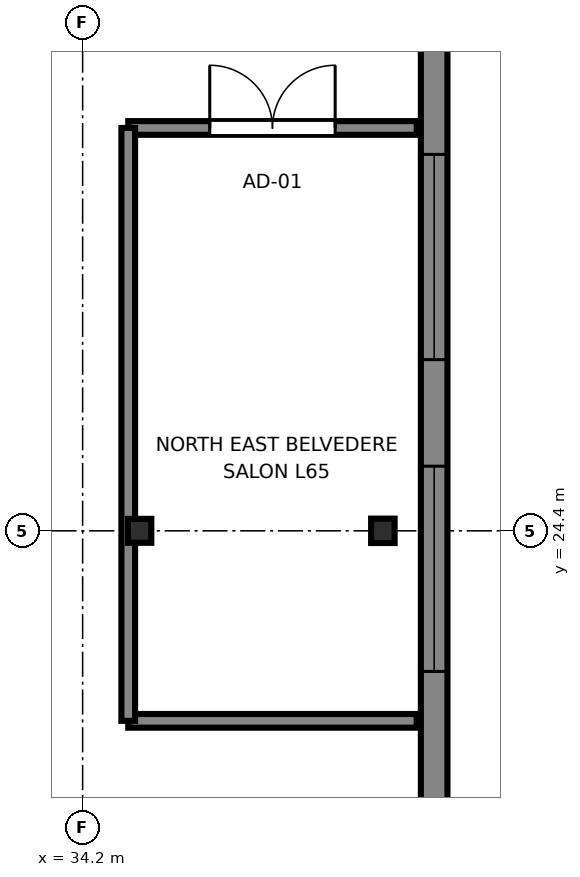
"""IFC4 building model, lengths in metres.
Left out: names, types, materials, properties, quantities, classifications, styles, units other than length and angle.
Written with IfcOpenShell. Run it as: python <this file> out.ifc"""

import sys

from ifc_helpers import new_model, si_unit, direction, frame, frame_2d, origin, origin_2d, place, context, subcontext, project, spatial, rectangle, i_section, extrude, source, transform, mapped, element, fill, save


model = new_model("IFC4")
c1 = context("Model", 3, precision=1e-05, world=origin(), true_north=direction((0.0, 1.0)))
c2 = subcontext(c1, "Body", "Model", "MODEL_VIEW")
j1 = project(units=[si_unit("LENGTHUNIT", "METRE"), si_unit("PLANEANGLEUNIT", "RADIAN")], contexts=[c1])
p1 = place(None, origin())
s1 = spatial("IfcSite", under=j1, at=p1, CompositionType="ELEMENT")
p2 = place(p1, origin())
s2 = spatial("IfcBuilding", under=s1, at=p2, CompositionType="ELEMENT")
p3 = place(p2, frame((0.0, 0.0, 245.2)))
s3 = spatial("IfcBuildingStorey", under=s2, at=p3, CompositionType="ELEMENT", Elevation=245.2)
m1 = source(origin(), c2, "Body", "SweptSolid", [
    extrude(i_section(OverallWidth=0.307, OverallDepth=0.315, WebThickness=0.012, FlangeThickness=0.019, FilletRadius=0.017, at=origin_2d()), origin(), (0.0, 0.0, 1.0), 3.55),
])
p4 = place(p3, frame((34.95, 24.4, 0.0), z_axis=(0.0, 0.0, 1.0), x_axis=(1.0, 0.0, 0.0)))
e1 = element("IfcColumn", 1, at=p4, inside=s3, PredefinedType="COLUMN", context=c2, shape_type="MappedRepresentation", body=[
    mapped(m1, transform((0.0, 0.0, 0.0), x_axis=(1.0, 0.0, 0.0), y_axis=(0.0, 1.0, 0.0), z_axis=(0.0, 0.0, 1.0), scale=1.0)),
])
m2 = source(origin(), c2, "Body", "SweptSolid", [
    extrude(i_section(OverallWidth=0.309, OverallDepth=0.321, WebThickness=0.014, FlangeThickness=0.022, FilletRadius=0.017, at=origin_2d()), origin(), (0.0, 0.0, 1.0), 3.55),
])
p5 = place(p3, frame((38.15, 24.4, 0.0), z_axis=(0.0, 0.0, 1.0), x_axis=(1.0, 0.0, 0.0)))
e2 = element("IfcColumn", 2, at=p5, inside=s3, PredefinedType="COLUMN", context=c2, shape_type="MappedRepresentation", body=[
    mapped(m2, transform((0.0, 0.0, 0.0), x_axis=(1.0, 0.0, 0.0), y_axis=(0.0, 1.0, 0.0), z_axis=(0.0, 0.0, 1.0), scale=1.0)),
])
p6 = place(p3, frame((38.825, 7.017, 0.0), z_axis=(0.0, 0.0, 1.0), x_axis=(0.0, 1.0, 0.0)))
e3 = element("IfcWall", 3, at=p6, inside=s3, PredefinedType="SOLIDWALL", context=c2, shape_type="SweptSolid", body=[
    extrude(rectangle(XDim=33.766, YDim=0.35, at=frame_2d((16.883, 0.0))), origin(), (0.0, 0.0, 1.0), 3.37),
])
p7 = place(p6, frame((1.576, 0.0, 0.68)))
e4 = element("IfcOpeningElement", 4, at=p7, cuts=e3, PredefinedType="OPENING", context=c2, shape_type="SweptSolid", body=[
    extrude(rectangle(XDim=2.7, YDim=1.95, at=frame_2d((1.35, 0.975))), frame((0.0, 0.185, 0.0), z_axis=(0.0, -1.0, 0.0), x_axis=(1.0, 0.0, 0.0)), (0.0, 0.0, 1.0), 0.37),
])
p8 = place(p6, frame((6.228, 0.0, 0.68)))
e5 = element("IfcOpeningElement", 5, at=p8, cuts=e3, PredefinedType="OPENING", context=c2, shape_type="SweptSolid", body=[
    extrude(rectangle(XDim=2.7, YDim=1.95, at=frame_2d((1.35, 0.975))), frame((0.0, 0.185, 0.0), z_axis=(0.0, -1.0, 0.0), x_axis=(1.0, 0.0, 0.0)), (0.0, 0.0, 1.0), 0.37),
])
p9 = place(p6, frame((10.881, 0.0, 0.68)))
e6 = element("IfcOpeningElement", 6, at=p9, cuts=e3, PredefinedType="OPENING", context=c2, shape_type="SweptSolid", body=[
    extrude(rectangle(XDim=2.7, YDim=1.95, at=frame_2d((1.35, 0.975))), frame((0.0, 0.185, 0.0), z_axis=(0.0, -1.0, 0.0), x_axis=(1.0, 0.0, 0.0)), (0.0, 0.0, 1.0), 0.37),
])
p10 = place(p6, frame((15.533, 0.0, 0.68)))
e7 = element("IfcOpeningElement", 7, at=p10, cuts=e3, PredefinedType="OPENING", context=c2, shape_type="SweptSolid", body=[
    extrude(rectangle(XDim=2.7, YDim=1.95, at=frame_2d((1.35, 0.975))), frame((0.0, 0.185, 0.0), z_axis=(0.0, -1.0, 0.0), x_axis=(1.0, 0.0, 0.0)), (0.0, 0.0, 1.0), 0.37),
])
p11 = place(p6, frame((19.635, 0.0, 0.68)))
e8 = element("IfcOpeningElement", 8, at=p11, cuts=e3, PredefinedType="OPENING", context=c2, shape_type="SweptSolid", body=[
    extrude(rectangle(XDim=2.7, YDim=1.95, at=frame_2d((1.35, 0.975))), frame((0.0, 0.185, 0.0), z_axis=(0.0, -1.0, 0.0), x_axis=(1.0, 0.0, 0.0)), (0.0, 0.0, 1.0), 0.37),
])
p12 = place(p6, frame((25.387, 0.0, 0.68)))
e9 = element("IfcOpeningElement", 9, at=p12, cuts=e3, PredefinedType="OPENING", context=c2, shape_type="SweptSolid", body=[
    extrude(rectangle(XDim=2.7, YDim=1.95, at=frame_2d((1.35, 0.975))), frame((0.0, 0.185, 0.0), z_axis=(0.0, -1.0, 0.0), x_axis=(1.0, 0.0, 0.0)), (0.0, 0.0, 1.0), 0.37),
])
p13 = place(p6, frame((29.489, 0.0, 0.68)))
e10 = element("IfcOpeningElement", 10, at=p13, cuts=e3, PredefinedType="OPENING", context=c2, shape_type="SweptSolid", body=[
    extrude(rectangle(XDim=2.7, YDim=1.95, at=frame_2d((1.35, 0.975))), frame((0.0, 0.185, 0.0), z_axis=(0.0, -1.0, 0.0), x_axis=(1.0, 0.0, 0.0)), (0.0, 0.0, 1.0), 0.37),
])
p14 = place(p3, frame((34.8, 21.9, 0.0), z_axis=(0.0, 0.0, 1.0), x_axis=(1.0, 0.0, 0.0)))
e11 = element("IfcWall", 11, at=p14, inside=s3, PredefinedType="PARTITIONING", context=c2, shape_type="SweptSolid", body=[
    extrude(rectangle(XDim=3.795, YDim=0.18, at=frame_2d((1.897, 0.0))), origin(), (0.0, 0.0, 1.0), 3.37),
])
p15 = place(p3, frame((34.8, 29.7, 0.0), z_axis=(0.0, 0.0, 1.0), x_axis=(1.0, 0.0, 0.0)))
e12 = element("IfcWall", 12, at=p15, inside=s3, PredefinedType="PARTITIONING", context=c2, shape_type="SweptSolid", body=[
    extrude(rectangle(XDim=3.795, YDim=0.18, at=frame_2d((1.897, 0.0))), origin(), (0.0, 0.0, 1.0), 3.37),
])
p16 = place(p15, frame((1.073, 0.0, 0.0)))
e13 = element("IfcOpeningElement", 13, at=p16, cuts=e12, PredefinedType="OPENING", context=c2, shape_type="SweptSolid", body=[
    extrude(rectangle(XDim=1.65, YDim=2.15, at=frame_2d((0.825, 1.075))), frame((0.0, 0.1, 0.0), z_axis=(0.0, -1.0, 0.0), x_axis=(1.0, 0.0, 0.0)), (0.0, 0.0, 1.0), 0.2),
])
p17 = place(p3, frame((34.8, 21.9, 0.0), z_axis=(0.0, 0.0, 1.0), x_axis=(0.0, 1.0, 0.0)))
e14 = element("IfcWall", 14, at=p17, inside=s3, PredefinedType="PARTITIONING", context=c2, shape_type="SweptSolid", body=[
    extrude(rectangle(XDim=7.8, YDim=0.18, at=frame_2d((3.9, 0.0))), origin(), (0.0, 0.0, 1.0), 2.827),
])
m3 = source(origin(), c2, "Body", "SweptSolid", [
    extrude(rectangle(XDim=2.7, YDim=1.95, at=frame_2d((1.35, 0.975))), frame((0.0, 0.09, 0.0), z_axis=(0.0, -1.0, 0.0), x_axis=(1.0, 0.0, 0.0)), (0.0, 0.0, 1.0), 0.06),
])
p18 = place(p10, origin())
e15 = element("IfcWindow", 15, at=p18, inside=s3, PartitioningType="TRIPLE_PANEL_HORIZONTAL", PredefinedType="WINDOW", context=c2, shape_type="MappedRepresentation", body=[
    mapped(m3, transform((0.0, 0.0, 0.0), x_axis=(1.0, 0.0, 0.0), y_axis=(0.0, 1.0, 0.0), z_axis=(0.0, 0.0, 1.0), scale=1.0)),
])
fill(e7, e15)
p19 = place(p11, origin())
e16 = element("IfcWindow", 16, at=p19, inside=s3, PartitioningType="TRIPLE_PANEL_HORIZONTAL", PredefinedType="WINDOW", context=c2, shape_type="MappedRepresentation", body=[
    mapped(m3, transform((0.0, 0.0, 0.0), x_axis=(1.0, 0.0, 0.0), y_axis=(0.0, 1.0, 0.0), z_axis=(0.0, 0.0, 1.0), scale=1.0)),
])
fill(e8, e16)
m4 = source(origin(), c2, "Body", "SweptSolid", [
    extrude(rectangle(XDim=1.65, YDim=2.15, at=frame_2d((0.825, 1.075))), frame((0.0, 0.025, 0.0), z_axis=(0.0, -1.0, 0.0), x_axis=(1.0, 0.0, 0.0)), (0.0, 0.0, 1.0), 0.05),
])
p20 = place(p16, origin())
e17 = element("IfcDoor", 17, at=p20, inside=s3, OperationType="DOUBLE_DOOR_SINGLE_SWING", PredefinedType="DOOR", context=c2, shape_type="MappedRepresentation", body=[
    mapped(m4, transform((0.0, 0.0, 0.0), x_axis=(1.0, 0.0, 0.0), y_axis=(0.0, 1.0, 0.0), z_axis=(0.0, 0.0, 1.0), scale=1.0)),
])
fill(e13, e17)
save(model, sys.argv[1])
